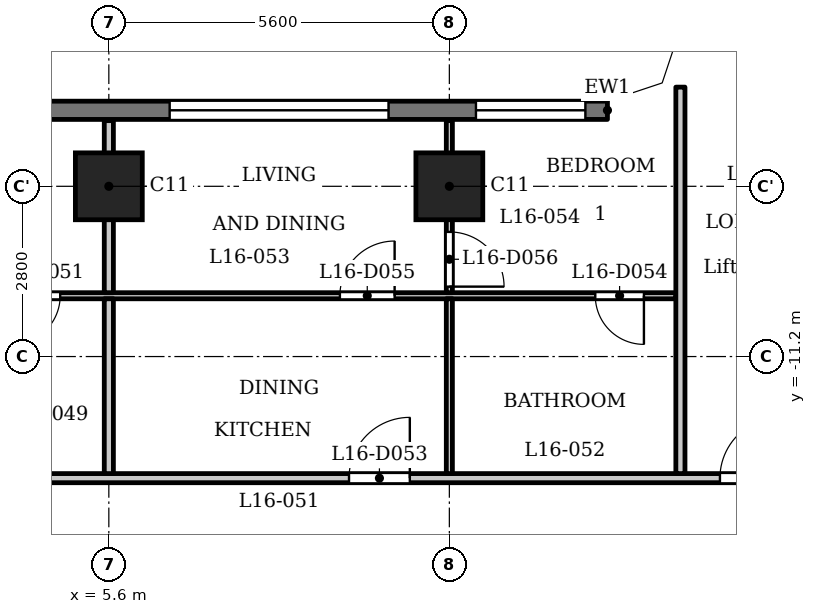
"""IFC4 building model, lengths in metres.
Left out: names, types, materials, properties, quantities, classifications, styles, units other than length and angle.
Written with IfcOpenShell. Run it as: python <this file> out.ifc"""

import sys

from ifc_helpers import new_model, si_unit, direction, frame, frame_2d, origin, origin_2d, place, context, subcontext, project, spatial, polyline, rectangle, outline, extrude, element, fill, save


model = new_model("IFC4")
c1 = context("Model", 3, precision=1e-05, world=origin(), true_north=direction((0.0, 1.0)))
c2 = subcontext(c1, "Body", "Model", "MODEL_VIEW")
j1 = project(units=[si_unit("LENGTHUNIT", "METRE"), si_unit("PLANEANGLEUNIT", "RADIAN")], contexts=[c1])
p1 = place(None, origin())
s1 = spatial("IfcSite", under=j1, at=p1, CompositionType="ELEMENT")
p2 = place(p1, origin())
s2 = spatial("IfcBuilding", under=s1, at=p2, CompositionType="ELEMENT")
p3 = place(p2, frame((0.0, 0.0, 65.5)))
s3 = spatial("IfcBuildingStorey", under=s2, at=p3, CompositionType="ELEMENT", Elevation=65.5)
for number, where, z_axis, x_axis in (
    (1, (5.6, -8.4, 0.0), (0.0, 0.0, 1.0), (1.0, 0.0, 0.0)),
    (2, (11.2, -8.4, 0.0), (0.0, 0.0, 1.0), (1.0, 0.0, 0.0)),
):
    element("IfcColumn", number, at=place(p3, frame(where, z_axis=z_axis, x_axis=x_axis)), inside=s3, PredefinedType="COLUMN", context=c2, shape_type="SweptSolid", body=[
        extrude(rectangle(XDim=1.1, YDim=1.1, at=origin_2d()), origin(), (0.0, 0.0, 1.0), 3.5),
    ])
p4 = place(p3, frame((13.8, -7.15, 0.0), z_axis=(0.0, 0.0, 1.0), x_axis=(-1.0, 0.0, 0.0)))
e3 = element("IfcWall", 3, at=p4, inside=s3, PredefinedType="SOLIDWALL", context=c2, shape_type="SweptSolid", body=[
    extrude(rectangle(XDim=27.6, YDim=0.3, at=frame_2d((13.8, 0.0))), origin(), (0.0, 0.0, 1.0), 3.2),
])
p5 = place(p4, frame((0.363, 0.0, 0.9)))
e4 = element("IfcOpeningElement", 4, at=p5, cuts=e3, PredefinedType="OPENING", context=c2, shape_type="SweptSolid", body=[
    extrude(rectangle(XDim=1.8, YDim=1.25, at=frame_2d((0.9, 0.625))), frame((0.0, 0.16, 0.0), z_axis=(0.0, -1.0, 0.0), x_axis=(1.0, 0.0, 0.0)), (0.0, 0.0, 1.0), 0.32),
])
p6 = place(p4, frame((3.6, 0.0, 1.2)))
e5 = element("IfcOpeningElement", 5, at=p6, cuts=e3, PredefinedType="OPENING", context=c2, shape_type="SweptSolid", body=[
    extrude(rectangle(XDim=3.6, YDim=0.95, at=frame_2d((1.8, 0.475))), frame((0.0, 0.16, 0.0), z_axis=(0.0, -1.0, 0.0), x_axis=(1.0, 0.0, 0.0)), (0.0, 0.0, 1.0), 0.32),
])
p7 = place(p4, frame((9.2, 0.0, 1.2)))
e6 = element("IfcOpeningElement", 6, at=p7, cuts=e3, PredefinedType="OPENING", context=c2, shape_type="SweptSolid", body=[
    extrude(rectangle(XDim=3.6, YDim=0.95, at=frame_2d((1.8, 0.475))), frame((0.0, 0.16, 0.0), z_axis=(0.0, -1.0, 0.0), x_axis=(1.0, 0.0, 0.0)), (0.0, 0.0, 1.0), 0.32),
])
p8 = place(p4, frame((14.8, 0.0, 1.2)))
e7 = element("IfcOpeningElement", 7, at=p8, cuts=e3, PredefinedType="OPENING", context=c2, shape_type="SweptSolid", body=[
    extrude(rectangle(XDim=3.6, YDim=0.95, at=frame_2d((1.8, 0.475))), frame((0.0, 0.16, 0.0), z_axis=(0.0, -1.0, 0.0), x_axis=(1.0, 0.0, 0.0)), (0.0, 0.0, 1.0), 0.32),
])
p9 = place(p4, frame((20.4, 0.0, 1.2)))
e8 = element("IfcOpeningElement", 8, at=p9, cuts=e3, PredefinedType="OPENING", context=c2, shape_type="SweptSolid", body=[
    extrude(rectangle(XDim=3.6, YDim=0.95, at=frame_2d((1.8, 0.475))), frame((0.0, 0.16, 0.0), z_axis=(0.0, -1.0, 0.0), x_axis=(1.0, 0.0, 0.0)), (0.0, 0.0, 1.0), 0.32),
])
p10 = place(p4, frame((25.438, 0.0, 0.9)))
e9 = element("IfcOpeningElement", 9, at=p10, cuts=e3, PredefinedType="OPENING", context=c2, shape_type="SweptSolid", body=[
    extrude(rectangle(XDim=1.8, YDim=1.25, at=frame_2d((0.9, 0.625))), frame((0.0, 0.16, 0.0), z_axis=(0.0, -1.0, 0.0), x_axis=(1.0, 0.0, 0.0)), (0.0, 0.0, 1.0), 0.32),
])
p11 = place(p3, frame((-17.4, -13.2, 0.0), z_axis=(0.0, 0.0, 1.0), x_axis=(1.0, 0.0, 0.0)))
e10 = element("IfcWall", 10, at=p11, inside=s3, PredefinedType="PARTITIONING", context=c2, shape_type="SweptSolid", body=[
    extrude(rectangle(XDim=34.8, YDim=0.15, at=frame_2d((17.4, 0.0))), origin(), (0.0, 0.0, 1.0), 3.2),
])
p12 = place(p11, frame((0.65, 0.0, 0.0)))
e11 = element("IfcOpeningElement", 11, at=p12, cuts=e10, PredefinedType="OPENING", context=c2, shape_type="SweptSolid", body=[
    extrude(rectangle(XDim=1.0, YDim=2.1, at=frame_2d((0.5, 1.05))), frame((0.0, 0.085, 0.0), z_axis=(0.0, -1.0, 0.0), x_axis=(1.0, 0.0, 0.0)), (0.0, 0.0, 1.0), 0.17),
])
p13 = place(p11, frame((33.05, 0.0, 0.0)))
e12 = element("IfcOpeningElement", 12, at=p13, cuts=e10, PredefinedType="OPENING", context=c2, shape_type="SweptSolid", body=[
    extrude(rectangle(XDim=1.0, YDim=2.1, at=frame_2d((0.5, 1.05))), frame((0.0, 0.085, 0.0), z_axis=(0.0, -1.0, 0.0), x_axis=(1.0, 0.0, 0.0)), (0.0, 0.0, 1.0), 0.17),
])
p14 = place(p11, frame((4.55, 0.0, 0.0)))
e13 = element("IfcOpeningElement", 13, at=p14, cuts=e10, PredefinedType="OPENING", context=c2, shape_type="SweptSolid", body=[
    extrude(rectangle(XDim=1.0, YDim=2.1, at=frame_2d((0.5, 1.05))), frame((0.0, 0.085, 0.0), z_axis=(0.0, -1.0, 0.0), x_axis=(1.0, 0.0, 0.0)), (0.0, 0.0, 1.0), 0.17),
])
p15 = place(p11, frame((15.75, 0.0, 0.0)))
e14 = element("IfcOpeningElement", 14, at=p15, cuts=e10, PredefinedType="OPENING", context=c2, shape_type="SweptSolid", body=[
    extrude(rectangle(XDim=1.0, YDim=2.1, at=frame_2d((0.5, 1.05))), frame((0.0, 0.085, 0.0), z_axis=(0.0, -1.0, 0.0), x_axis=(1.0, 0.0, 0.0)), (0.0, 0.0, 1.0), 0.17),
])
p16 = place(p11, frame((18.1, 0.0, 0.0)))
e15 = element("IfcOpeningElement", 15, at=p16, cuts=e10, PredefinedType="OPENING", context=c2, shape_type="SweptSolid", body=[
    extrude(rectangle(XDim=1.0, YDim=2.1, at=frame_2d((0.5, 1.05))), frame((0.0, 0.085, 0.0), z_axis=(0.0, -1.0, 0.0), x_axis=(1.0, 0.0, 0.0)), (0.0, 0.0, 1.0), 0.17),
])
p17 = place(p11, frame((26.95, 0.0, 0.0)))
e16 = element("IfcOpeningElement", 16, at=p17, cuts=e10, PredefinedType="OPENING", context=c2, shape_type="SweptSolid", body=[
    extrude(rectangle(XDim=1.0, YDim=2.1, at=frame_2d((0.5, 1.05))), frame((0.0, 0.085, 0.0), z_axis=(0.0, -1.0, 0.0), x_axis=(1.0, 0.0, 0.0)), (0.0, 0.0, 1.0), 0.17),
])
p18 = place(p3, frame((-14.925, -10.2, 0.0), z_axis=(0.0, 0.0, 1.0), x_axis=(1.0, 0.0, 0.0)))
e17 = element("IfcWall", 17, at=p18, inside=s3, PredefinedType="PARTITIONING", context=c2, shape_type="SweptSolid", body=[
    extrude(rectangle(XDim=29.85, YDim=0.1, at=frame_2d((14.925, 0.0))), origin(), (0.0, 0.0, 1.0), 3.2),
])
p19 = place(p18, frame((7.625, 0.0, 0.0)))
e18 = element("IfcOpeningElement", 18, at=p19, cuts=e17, PredefinedType="OPENING", context=c2, shape_type="SweptSolid", body=[
    extrude(rectangle(XDim=0.8, YDim=2.1, at=frame_2d((0.4, 1.05))), frame((0.0, 0.06, 0.0), z_axis=(0.0, -1.0, 0.0), x_axis=(1.0, 0.0, 0.0)), (0.0, 0.0, 1.0), 0.12),
])
p20 = place(p18, frame((1.925, 0.0, 0.0)))
e19 = element("IfcOpeningElement", 19, at=p20, cuts=e17, PredefinedType="OPENING", context=c2, shape_type="SweptSolid", body=[
    extrude(rectangle(XDim=0.9, YDim=2.1, at=frame_2d((0.45, 1.05))), frame((0.0, 0.06, 0.0), z_axis=(0.0, -1.0, 0.0), x_axis=(1.0, 0.0, 0.0)), (0.0, 0.0, 1.0), 0.12),
])
p21 = place(p18, frame((10.225, 0.0, 0.0)))
e20 = element("IfcOpeningElement", 20, at=p21, cuts=e17, PredefinedType="OPENING", context=c2, shape_type="SweptSolid", body=[
    extrude(rectangle(XDim=0.8, YDim=2.1, at=frame_2d((0.4, 1.05))), frame((0.0, 0.06, 0.0), z_axis=(0.0, -1.0, 0.0), x_axis=(1.0, 0.0, 0.0)), (0.0, 0.0, 1.0), 0.12),
])
p22 = place(p18, frame((13.125, 0.0, 0.0)))
e21 = element("IfcOpeningElement", 21, at=p22, cuts=e17, PredefinedType="OPENING", context=c2, shape_type="SweptSolid", body=[
    extrude(rectangle(XDim=0.9, YDim=2.1, at=frame_2d((0.45, 1.05))), frame((0.0, 0.06, 0.0), z_axis=(0.0, -1.0, 0.0), x_axis=(1.0, 0.0, 0.0)), (0.0, 0.0, 1.0), 0.12),
])
p23 = place(p18, frame((18.925, 0.0, 0.0)))
e22 = element("IfcOpeningElement", 22, at=p23, cuts=e17, PredefinedType="OPENING", context=c2, shape_type="SweptSolid", body=[
    extrude(rectangle(XDim=0.8, YDim=2.1, at=frame_2d((0.4, 1.05))), frame((0.0, 0.06, 0.0), z_axis=(0.0, -1.0, 0.0), x_axis=(1.0, 0.0, 0.0)), (0.0, 0.0, 1.0), 0.12),
])
p24 = place(p18, frame((15.725, 0.0, 0.0)))
e23 = element("IfcOpeningElement", 23, at=p24, cuts=e17, PredefinedType="OPENING", context=c2, shape_type="SweptSolid", body=[
    extrude(rectangle(XDim=0.9, YDim=2.1, at=frame_2d((0.45, 1.05))), frame((0.0, 0.06, 0.0), z_axis=(0.0, -1.0, 0.0), x_axis=(1.0, 0.0, 0.0)), (0.0, 0.0, 1.0), 0.12),
])
p25 = place(p18, frame((28.525, 0.0, 0.0)))
e24 = element("IfcOpeningElement", 24, at=p25, cuts=e17, PredefinedType="OPENING", context=c2, shape_type="SweptSolid", body=[
    extrude(rectangle(XDim=0.8, YDim=2.1, at=frame_2d((0.4, 1.05))), frame((0.0, 0.06, 0.0), z_axis=(0.0, -1.0, 0.0), x_axis=(1.0, 0.0, 0.0)), (0.0, 0.0, 1.0), 0.12),
])
p26 = place(p18, frame((24.325, 0.0, 0.0)))
e25 = element("IfcOpeningElement", 25, at=p26, cuts=e17, PredefinedType="OPENING", context=c2, shape_type="SweptSolid", body=[
    extrude(rectangle(XDim=0.9, YDim=2.1, at=frame_2d((0.45, 1.05))), frame((0.0, 0.06, 0.0), z_axis=(0.0, -1.0, 0.0), x_axis=(1.0, 0.0, 0.0)), (0.0, 0.0, 1.0), 0.12),
])
p27 = place(p3, frame((5.6, -13.125, 0.0), z_axis=(0.0, 0.0, 1.0), x_axis=(0.0, 1.0, 0.0)))
e26 = element("IfcWall", 26, at=p27, inside=s3, PredefinedType="PARTITIONING", context=c2, shape_type="SweptSolid", body=[
    extrude(rectangle(XDim=2.875, YDim=0.15, at=frame_2d((1.438, 0.0))), origin(), (0.0, 0.0, 1.0), 3.2),
])
p28 = place(p3, frame((5.6, -10.15, 0.0), z_axis=(0.0, 0.0, 1.0), x_axis=(0.0, 1.0, 0.0)))
e27 = element("IfcWall", 27, at=p28, inside=s3, PredefinedType="PARTITIONING", context=c2, shape_type="SweptSolid", body=[
    extrude(rectangle(XDim=2.83, YDim=0.15, at=frame_2d((1.415, 0.0))), origin(), (0.0, 0.0, 1.0), 3.2),
])
p29 = place(p3, frame((11.2, -13.125, 0.0), z_axis=(0.0, 0.0, 1.0), x_axis=(0.0, 1.0, 0.0)))
e28 = element("IfcWall", 28, at=p29, inside=s3, PredefinedType="PARTITIONING", context=c2, shape_type="SweptSolid", body=[
    extrude(rectangle(XDim=2.875, YDim=0.1, at=frame_2d((1.438, 0.0))), origin(), (0.0, 0.0, 1.0), 3.2),
])
p30 = place(p3, frame((11.2, -10.15, 0.0), z_axis=(0.0, 0.0, 1.0), x_axis=(0.0, 1.0, 0.0)))
e29 = element("IfcWall", 29, at=p30, inside=s3, PredefinedType="PARTITIONING", context=c2, shape_type="SweptSolid", body=[
    extrude(rectangle(XDim=2.83, YDim=0.1, at=frame_2d((1.415, 0.0))), origin(), (0.0, 0.0, 1.0), 3.2),
])
p31 = place(p30, frame((0.1, 0.0, 0.0)))
e30 = element("IfcOpeningElement", 30, at=p31, cuts=e29, PredefinedType="OPENING", context=c2, shape_type="SweptSolid", body=[
    extrude(rectangle(XDim=0.9, YDim=2.1, at=frame_2d((0.45, 1.05))), frame((0.0, 0.06, 0.0), z_axis=(0.0, -1.0, 0.0), x_axis=(1.0, 0.0, 0.0)), (0.0, 0.0, 1.0), 0.12),
])
p32 = place(p3, frame((15.0, -13.125, 0.0), z_axis=(0.0, 0.0, 1.0), x_axis=(0.0, 1.0, 0.0)))
e31 = element("IfcWall", 31, at=p32, inside=s3, PredefinedType="PARTITIONING", context=c2, shape_type="SweptSolid", body=[
    extrude(rectangle(XDim=6.356, YDim=0.15, at=frame_2d((3.178, 0.0))), origin(), (0.0, 0.0, 1.0), 3.2),
])
p33 = place(p3, origin())
e32 = element("IfcWall", 32, at=p33, inside=s3, PredefinedType="SOLIDWALL", context=c2, shape_type="SweptSolid", body=[
    extrude(outline(polyline([(14.937, -6.937), (15.3, -5.849), (15.3, -5.8), (15.0, -5.8), (14.7, -6.7), (13.8, -7.0), (13.8, -7.3), (13.849, -7.3), (14.937, -6.937)])), origin(), (0.0, 0.0, 1.0), 3.2),
])
p34 = place(p13, origin())
e33 = element("IfcDoor", 33, at=p34, inside=s3, OperationType="SINGLE_SWING_LEFT", PredefinedType="DOOR", context=c2, shape_type="SweptSolid", body=[
    extrude(rectangle(XDim=1.0, YDim=2.1, at=frame_2d((0.5, 1.05))), frame((0.0, 0.025, 0.0), z_axis=(0.0, -1.0, 0.0), x_axis=(1.0, 0.0, 0.0)), (0.0, 0.0, 1.0), 0.05),
])
fill(e12, e33)
p35 = place(p23, origin())
e34 = element("IfcDoor", 34, at=p35, inside=s3, OperationType="SINGLE_SWING_LEFT", PredefinedType="DOOR", context=c2, shape_type="SweptSolid", body=[
    extrude(rectangle(XDim=0.8, YDim=2.1, at=frame_2d((0.4, 1.05))), frame((0.0, 0.025, 0.0), z_axis=(0.0, -1.0, 0.0), x_axis=(1.0, 0.0, 0.0)), (0.0, 0.0, 1.0), 0.05),
])
fill(e22, e34)
p36 = place(p17, origin())
e35 = element("IfcDoor", 35, at=p36, inside=s3, OperationType="SINGLE_SWING_LEFT", PredefinedType="DOOR", context=c2, shape_type="SweptSolid", body=[
    extrude(rectangle(XDim=1.0, YDim=2.1, at=frame_2d((0.5, 1.05))), frame((0.0, 0.025, 0.0), z_axis=(0.0, -1.0, 0.0), x_axis=(1.0, 0.0, 0.0)), (0.0, 0.0, 1.0), 0.05),
])
fill(e16, e35)
p37 = place(p25, origin())
e36 = element("IfcDoor", 36, at=p37, inside=s3, OperationType="SINGLE_SWING_RIGHT", PredefinedType="DOOR", context=c2, shape_type="SweptSolid", body=[
    extrude(rectangle(XDim=0.8, YDim=2.1, at=frame_2d((0.4, 1.05))), frame((0.0, 0.025, 0.0), z_axis=(0.0, -1.0, 0.0), x_axis=(1.0, 0.0, 0.0)), (0.0, 0.0, 1.0), 0.05),
])
fill(e24, e36)
p38 = place(p26, origin())
e37 = element("IfcDoor", 37, at=p38, inside=s3, OperationType="SINGLE_SWING_LEFT", PredefinedType="DOOR", context=c2, shape_type="SweptSolid", body=[
    extrude(rectangle(XDim=0.9, YDim=2.1, at=frame_2d((0.45, 1.05))), frame((0.0, 0.025, 0.0), z_axis=(0.0, -1.0, 0.0), x_axis=(1.0, 0.0, 0.0)), (0.0, 0.0, 1.0), 0.05),
])
fill(e25, e37)
p39 = place(p31, origin())
e38 = element("IfcDoor", 38, at=p39, inside=s3, OperationType="SINGLE_SWING_LEFT", PredefinedType="DOOR", context=c2, shape_type="SweptSolid", body=[
    extrude(rectangle(XDim=0.9, YDim=2.1, at=frame_2d((0.45, 1.05))), frame((0.0, 0.025, 0.0), z_axis=(0.0, -1.0, 0.0), x_axis=(1.0, 0.0, 0.0)), (0.0, 0.0, 1.0), 0.05),
])
fill(e30, e38)
p40 = place(p5, origin())
e39 = element("IfcWindow", 39, at=p40, inside=s3, PartitioningType="SINGLE_PANEL", PredefinedType="WINDOW", context=c2, shape_type="SweptSolid", body=[
    extrude(rectangle(XDim=1.8, YDim=1.25, at=frame_2d((0.9, 0.625))), frame((0.0, 0.03, 0.0), z_axis=(0.0, -1.0, 0.0), x_axis=(1.0, 0.0, 0.0)), (0.0, 0.0, 1.0), 0.06),
])
fill(e4, e39)
p41 = place(p6, origin())
e40 = element("IfcWindow", 40, at=p41, inside=s3, PartitioningType="SINGLE_PANEL", PredefinedType="WINDOW", context=c2, shape_type="SweptSolid", body=[
    extrude(rectangle(XDim=3.6, YDim=0.95, at=frame_2d((1.8, 0.475))), frame((0.0, 0.03, 0.0), z_axis=(0.0, -1.0, 0.0), x_axis=(1.0, 0.0, 0.0)), (0.0, 0.0, 1.0), 0.06),
])
fill(e5, e40)
save(model, sys.argv[1])
